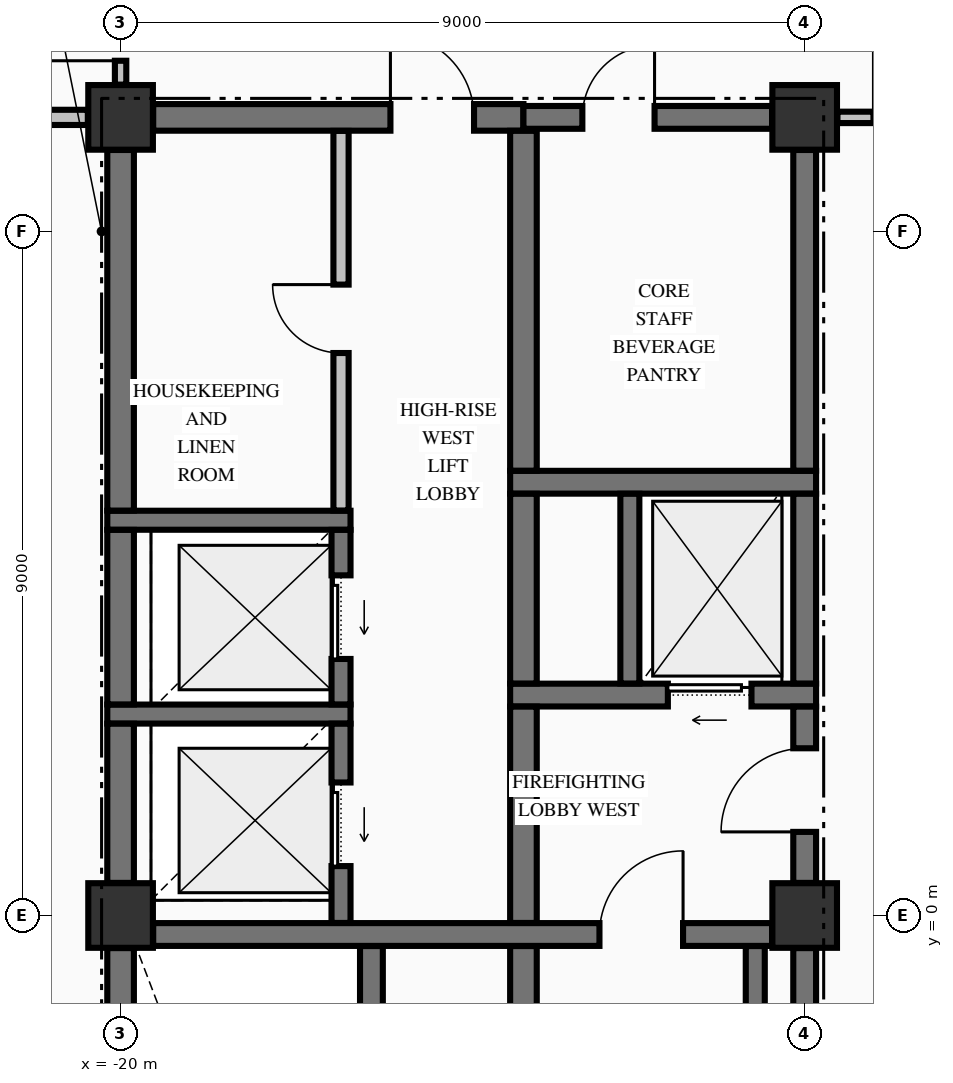
"""IFC4 building model, lengths in metres.
Left out: names, types, materials, properties, quantities, classifications, styles, units other than length and angle.
Written with IfcOpenShell. Run it as: python <this file> out.ifc"""

import sys

from ifc_helpers import new_model, si_unit, direction, frame, frame_2d, origin, origin_2d, place, context, subcontext, project, spatial, rectangle, extrude, element, fill, save


model = new_model("IFC4")
c1 = context("Model", 3, precision=1e-05, world=origin(), true_north=direction((0.0, 1.0)))
c2 = subcontext(c1, "Body", "Model", "MODEL_VIEW")
j1 = project(units=[si_unit("LENGTHUNIT", "METRE"), si_unit("PLANEANGLEUNIT", "RADIAN")], contexts=[c1])
p1 = place(None, origin())
s1 = spatial("IfcSite", under=j1, at=p1, CompositionType="ELEMENT")
p2 = place(p1, origin())
s2 = spatial("IfcBuilding", under=s1, at=p2, CompositionType="ELEMENT")
p3 = place(p2, frame((0.0, 0.0, 208.46)))
s3 = spatial("IfcBuildingStorey", under=s2, at=p3, CompositionType="ELEMENT", Elevation=208.46)
for number, where, z_axis, x_axis in (
    (1, (-20.0, 10.5, -0.25), (0.0, 0.0, 1.0), (1.0, 0.0, 0.0)),
    (2, (-11.0, 0.0, -0.25), (0.0, 0.0, 1.0), (1.0, 0.0, 0.0)),
    (3, (-11.0, 10.5, -0.25), (0.0, 0.0, 1.0), (1.0, 0.0, 0.0)),
    (4, (-20.0, 0.0, -0.25), (0.0, 0.0, 1.0), (1.0, 0.0, 0.0)),
):
    element("IfcColumn", number, at=place(p3, frame(where, z_axis=z_axis, x_axis=x_axis)), inside=s3, PredefinedType="COLUMN", context=c2, shape_type="SweptSolid", body=[
        extrude(rectangle(XDim=0.85, YDim=0.85, at=origin_2d()), origin(), (0.0, 0.0, 1.0), 3.325),
    ])
p4 = place(p3, frame((-19.571, -0.25, 0.0), z_axis=(0.0, 0.0, 1.0), x_axis=(1.0, 0.0, 0.0)))
e5 = element("IfcWall", 5, at=p4, inside=s3, PredefinedType="SHEAR", context=c2, shape_type="SweptSolid", body=[
    extrude(rectangle(XDim=8.142, YDim=0.3, at=frame_2d((4.071, 0.0))), origin(), (0.0, 0.0, 1.0), 3.075),
])
p5 = place(p4, frame((5.871, 0.0, 0.0)))
e6 = element("IfcOpeningElement", 6, at=p5, cuts=e5, PredefinedType="OPENING", context=c2, shape_type="SweptSolid", body=[
    extrude(rectangle(XDim=1.1, YDim=2.15, at=frame_2d((0.55, 1.075))), frame((0.0, 0.16, 0.0), z_axis=(0.0, -1.0, 0.0), x_axis=(1.0, 0.0, 0.0)), (0.0, 0.0, 1.0), 0.32),
])
p6 = place(p3, frame((-20.175, 2.65, 0.0), z_axis=(0.0, 0.0, 1.0), x_axis=(1.0, 0.0, 0.0)))
e7 = element("IfcWall", 7, at=p6, inside=s3, PredefinedType="SOLIDWALL", context=c2, shape_type="SweptSolid", body=[
    extrude(rectangle(XDim=3.2, YDim=0.25, at=frame_2d((1.6, 0.0))), origin(), (0.0, 0.0, 1.0), 3.075),
])
p7 = place(p3, frame((-14.875, 2.9, 0.0), z_axis=(0.0, 0.0, 1.0), x_axis=(1.0, 0.0, 0.0)))
e8 = element("IfcWall", 8, at=p7, inside=s3, PredefinedType="SHEAR", context=c2, shape_type="SweptSolid", body=[
    extrude(rectangle(XDim=4.025, YDim=0.3, at=frame_2d((2.012, 0.0))), origin(), (0.0, 0.0, 1.0), 3.075),
])
p8 = place(p7, frame((2.075, 0.0, 0.0)))
e9 = element("IfcOpeningElement", 9, at=p8, cuts=e8, PredefinedType="OPENING", context=c2, shape_type="SweptSolid", body=[
    extrude(rectangle(XDim=1.1, YDim=2.2, at=frame_2d((0.55, 1.1))), frame((0.0, 0.16, 0.0), z_axis=(0.0, -1.0, 0.0), x_axis=(1.0, 0.0, 0.0)), (0.0, 0.0, 1.0), 0.32),
])
p9 = place(p3, frame((-20.175, 5.2, 0.0), z_axis=(0.0, 0.0, 1.0), x_axis=(1.0, 0.0, 0.0)))
e10 = element("IfcWall", 10, at=p9, inside=s3, PredefinedType="SOLIDWALL", context=c2, shape_type="SweptSolid", body=[
    extrude(rectangle(XDim=3.2, YDim=0.25, at=frame_2d((1.6, 0.0))), origin(), (0.0, 0.0, 1.0), 3.075),
])
p10 = place(p3, frame((-14.875, 5.7, 0.0), z_axis=(0.0, 0.0, 1.0), x_axis=(1.0, 0.0, 0.0)))
e11 = element("IfcWall", 11, at=p10, inside=s3, PredefinedType="SHEAR", context=c2, shape_type="SweptSolid", body=[
    extrude(rectangle(XDim=4.025, YDim=0.3, at=frame_2d((2.012, 0.0))), origin(), (0.0, 0.0, 1.0), 3.075),
])
p11 = place(p3, frame((-19.571, 10.5, 0.0), z_axis=(0.0, 0.0, 1.0), x_axis=(1.0, 0.0, 0.0)))
e12 = element("IfcWall", 12, at=p11, inside=s3, PredefinedType="SHEAR", context=c2, shape_type="SweptSolid", body=[
    extrude(rectangle(XDim=4.871, YDim=0.35, at=frame_2d((2.436, 0.0))), origin(), (0.0, 0.0, 1.0), 3.075),
])
p12 = place(p11, frame((3.121, 0.0, 0.0)))
e13 = element("IfcOpeningElement", 13, at=p12, cuts=e12, PredefinedType="OPENING", context=c2, shape_type="SweptSolid", body=[
    extrude(rectangle(XDim=1.1, YDim=2.15, at=frame_2d((0.55, 1.075))), frame((0.0, 0.185, 0.0), z_axis=(0.0, -1.0, 0.0), x_axis=(1.0, 0.0, 0.0)), (0.0, 0.0, 1.0), 0.37),
])
p13 = place(p3, frame((-14.7, 10.5, 0.0), z_axis=(0.0, 0.0, 1.0), x_axis=(1.0, 0.0, 0.0)))
e14 = element("IfcWall", 14, at=p13, inside=s3, PredefinedType="SHEAR", context=c2, shape_type="SweptSolid", body=[
    extrude(rectangle(XDim=3.271, YDim=0.3, at=frame_2d((1.635, 0.0))), origin(), (0.0, 0.0, 1.0), 3.075),
])
p14 = place(p13, frame((0.775, 0.0, 0.0)))
e15 = element("IfcOpeningElement", 15, at=p14, cuts=e14, PredefinedType="OPENING", context=c2, shape_type="SweptSolid", body=[
    extrude(rectangle(XDim=0.95, YDim=2.15, at=frame_2d((0.475, 1.075))), frame((0.0, 0.16, 0.0), z_axis=(0.0, -1.0, 0.0), x_axis=(1.0, 0.0, 0.0)), (0.0, 0.0, 1.0), 0.32),
])
p15 = place(p3, frame((-26.835, 10.5, 0.0), z_axis=(0.0, 0.0, 1.0), x_axis=(1.0, 0.0, 0.0)))
e16 = element("IfcWall", 16, at=p15, inside=s3, PredefinedType="PARTITIONING", context=c2, shape_type="SweptSolid", body=[
    extrude(rectangle(XDim=6.404, YDim=0.2, at=frame_2d((3.202, 0.0))), origin(), (0.0, 0.0, 1.0), 3.075),
])
p16 = place(p15, frame((2.86, 0.0, 0.0)))
e17 = element("IfcOpeningElement", 17, at=p16, cuts=e16, PredefinedType="OPENING", context=c2, shape_type="SweptSolid", body=[
    extrude(rectangle(XDim=0.95, YDim=2.15, at=frame_2d((0.475, 1.075))), frame((0.0, 0.11, 0.0), z_axis=(0.0, -1.0, 0.0), x_axis=(1.0, 0.0, 0.0)), (0.0, 0.0, 1.0), 0.22),
])
p17 = place(p3, frame((-10.569, 10.5, 0.0), z_axis=(0.0, 0.0, 1.0), x_axis=(1.0, 0.0, 0.0)))
e18 = element("IfcWall", 18, at=p17, inside=s3, PredefinedType="PARTITIONING", context=c2, shape_type="SweptSolid", body=[
    extrude(rectangle(XDim=21.138, YDim=0.15, at=frame_2d((10.569, 0.0))), origin(), (0.0, 0.0, 1.0), 3.075),
])
p18 = place(p17, frame((0.474, 0.0, 0.0)))
e19 = element("IfcOpeningElement", 19, at=p18, cuts=e18, PredefinedType="OPENING", context=c2, shape_type="SweptSolid", body=[
    extrude(rectangle(XDim=1.05, YDim=2.15, at=frame_2d((0.525, 1.075))), frame((0.0, 0.085, 0.0), z_axis=(0.0, -1.0, 0.0), x_axis=(1.0, 0.0, 0.0)), (0.0, 0.0, 1.0), 0.17),
])
p19 = place(p17, frame((19.614, 0.0, 0.0)))
e20 = element("IfcOpeningElement", 20, at=p19, cuts=e18, PredefinedType="OPENING", context=c2, shape_type="SweptSolid", body=[
    extrude(rectangle(XDim=1.05, YDim=2.15, at=frame_2d((0.525, 1.075))), frame((0.0, 0.085, 0.0), z_axis=(0.0, -1.0, 0.0), x_axis=(1.0, 0.0, 0.0)), (0.0, 0.0, 1.0), 0.17),
])
p20 = place(p3, frame((-20.0, -9.521, 0.0), z_axis=(0.0, 0.0, 1.0), x_axis=(0.0, 1.0, 0.0)))
e21 = element("IfcWall", 21, at=p20, inside=s3, PredefinedType="SHEAR", context=c2, shape_type="SweptSolid", body=[
    extrude(rectangle(XDim=9.092, YDim=0.35, at=frame_2d((4.546, 0.0))), origin(), (0.0, 0.0, 1.0), 3.075),
])
p21 = place(p3, frame((-20.0, 0.429, 0.0), z_axis=(0.0, 0.0, 1.0), x_axis=(0.0, 1.0, 0.0)))
e22 = element("IfcWall", 22, at=p21, inside=s3, PredefinedType="SHEAR", context=c2, shape_type="SweptSolid", body=[
    extrude(rectangle(XDim=2.094, YDim=0.35, at=frame_2d((1.047, 0.0))), origin(), (0.0, 0.0, 1.0), 3.075),
])
p22 = place(p3, frame((-20.0, 2.777, 0.0), z_axis=(0.0, 0.0, 1.0), x_axis=(0.0, 1.0, 0.0)))
e23 = element("IfcWall", 23, at=p22, inside=s3, PredefinedType="SHEAR", context=c2, shape_type="SweptSolid", body=[
    extrude(rectangle(XDim=2.296, YDim=0.35, at=frame_2d((1.148, 0.0))), origin(), (0.0, 0.0, 1.0), 3.075),
])
p23 = place(p3, frame((-20.0, 5.327, 0.0), z_axis=(0.0, 0.0, 1.0), x_axis=(0.0, 1.0, 0.0)))
e24 = element("IfcWall", 24, at=p23, inside=s3, PredefinedType="SHEAR", context=c2, shape_type="SweptSolid", body=[
    extrude(rectangle(XDim=4.744, YDim=0.35, at=frame_2d((2.372, 0.0))), origin(), (0.0, 0.0, 1.0), 3.075),
])
p24 = place(p3, frame((-17.1, -0.098, 0.0), z_axis=(0.0, 0.0, 1.0), x_axis=(0.0, 1.0, 0.0)))
e25 = element("IfcWall", 25, at=p24, inside=s3, PredefinedType="SOLIDWALL", context=c2, shape_type="SweptSolid", body=[
    extrude(rectangle(XDim=2.621, YDim=0.25, at=frame_2d((1.311, 0.0))), origin(), (0.0, 0.0, 1.0), 3.075),
])
p25 = place(p24, frame((0.748, 0.0, 0.0)))
e26 = element("IfcOpeningElement", 26, at=p25, cuts=e25, PredefinedType="OPENING", context=c2, shape_type="SweptSolid", body=[
    extrude(rectangle(XDim=1.1, YDim=2.2, at=frame_2d((0.55, 1.1))), frame((0.0, 0.135, 0.0), z_axis=(0.0, -1.0, 0.0), x_axis=(1.0, 0.0, 0.0)), (0.0, 0.0, 1.0), 0.27),
])
p26 = place(p3, frame((-17.1, 2.777, 0.0), z_axis=(0.0, 0.0, 1.0), x_axis=(0.0, 1.0, 0.0)))
e27 = element("IfcWall", 27, at=p26, inside=s3, PredefinedType="SOLIDWALL", context=c2, shape_type="SweptSolid", body=[
    extrude(rectangle(XDim=2.296, YDim=0.25, at=frame_2d((1.148, 0.0))), origin(), (0.0, 0.0, 1.0), 3.075),
])
p27 = place(p26, frame((0.598, 0.0, 0.0)))
e28 = element("IfcOpeningElement", 28, at=p27, cuts=e27, PredefinedType="OPENING", context=c2, shape_type="SweptSolid", body=[
    extrude(rectangle(XDim=1.1, YDim=2.2, at=frame_2d((0.55, 1.1))), frame((0.0, 0.135, 0.0), z_axis=(0.0, -1.0, 0.0), x_axis=(1.0, 0.0, 0.0)), (0.0, 0.0, 1.0), 0.27),
])
p28 = place(p3, frame((-16.7, -9.773, 0.0), z_axis=(0.0, 0.0, 1.0), x_axis=(0.0, 1.0, 0.0)))
e29 = element("IfcWall", 29, at=p28, inside=s3, PredefinedType="SHEAR", context=c2, shape_type="SweptSolid", body=[
    extrude(rectangle(XDim=9.371, YDim=0.3, at=frame_2d((4.686, 0.0))), origin(), (0.0, 0.0, 1.0), 3.075),
])
p29 = place(p3, frame((-14.7, -9.773, 0.0), z_axis=(0.0, 0.0, 1.0), x_axis=(0.0, 1.0, 0.0)))
e30 = element("IfcWall", 30, at=p29, inside=s3, PredefinedType="SHEAR", context=c2, shape_type="SweptSolid", body=[
    extrude(rectangle(XDim=9.371, YDim=0.35, at=frame_2d((4.686, 0.0))), origin(), (0.0, 0.0, 1.0), 3.075),
])
p30 = place(p3, frame((-14.7, -0.098, 0.0), z_axis=(0.0, 0.0, 1.0), x_axis=(0.0, 1.0, 0.0)))
e31 = element("IfcWall", 31, at=p30, inside=s3, PredefinedType="SHEAR", context=c2, shape_type="SweptSolid", body=[
    extrude(rectangle(XDim=2.846, YDim=0.35, at=frame_2d((1.423, 0.0))), origin(), (0.0, 0.0, 1.0), 3.075),
])
p31 = place(p3, frame((-14.7, 3.052, 0.0), z_axis=(0.0, 0.0, 1.0), x_axis=(0.0, 1.0, 0.0)))
e32 = element("IfcWall", 32, at=p31, inside=s3, PredefinedType="SHEAR", context=c2, shape_type="SweptSolid", body=[
    extrude(rectangle(XDim=2.496, YDim=0.35, at=frame_2d((1.248, 0.0))), origin(), (0.0, 0.0, 1.0), 3.075),
])
p32 = place(p3, frame((-14.7, 5.852, 0.0), z_axis=(0.0, 0.0, 1.0), x_axis=(0.0, 1.0, 0.0)))
e33 = element("IfcWall", 33, at=p32, inside=s3, PredefinedType="SHEAR", context=c2, shape_type="SweptSolid", body=[
    extrude(rectangle(XDim=4.471, YDim=0.35, at=frame_2d((2.235, 0.0))), origin(), (0.0, 0.0, 1.0), 3.075),
])
p33 = place(p3, frame((-13.3, 3.052, 0.0), z_axis=(0.0, 0.0, 1.0), x_axis=(0.0, 1.0, 0.0)))
e34 = element("IfcWall", 34, at=p33, inside=s3, PredefinedType="SOLIDWALL", context=c2, shape_type="SweptSolid", body=[
    extrude(rectangle(XDim=2.496, YDim=0.25, at=frame_2d((1.248, 0.0))), origin(), (0.0, 0.0, 1.0), 3.075),
])
p34 = place(p3, frame((-11.65, -9.798, 0.0), z_axis=(0.0, 0.0, 1.0), x_axis=(0.0, 1.0, 0.0)))
e35 = element("IfcWall", 35, at=p34, inside=s3, PredefinedType="SOLIDWALL", context=c2, shape_type="SweptSolid", body=[
    extrude(rectangle(XDim=9.396, YDim=0.25, at=frame_2d((4.698, 0.0))), origin(), (0.0, 0.0, 1.0), 3.075),
])
p35 = place(p3, frame((-11.0, -9.521, 0.0), z_axis=(0.0, 0.0, 1.0), x_axis=(0.0, 1.0, 0.0)))
e36 = element("IfcWall", 36, at=p35, inside=s3, PredefinedType="SHEAR", context=c2, shape_type="SweptSolid", body=[
    extrude(rectangle(XDim=9.092, YDim=0.3, at=frame_2d((4.546, 0.0))), origin(), (0.0, 0.0, 1.0), 3.075),
])
p36 = place(p3, frame((-11.0, 0.429, 0.0), z_axis=(0.0, 0.0, 1.0), x_axis=(0.0, 1.0, 0.0)))
e37 = element("IfcWall", 37, at=p36, inside=s3, PredefinedType="SHEAR", context=c2, shape_type="SweptSolid", body=[
    extrude(rectangle(XDim=2.319, YDim=0.3, at=frame_2d((1.16, 0.0))), origin(), (0.0, 0.0, 1.0), 3.075),
])
p37 = place(p36, frame((0.671, 0.0, 0.0)))
e38 = element("IfcOpeningElement", 38, at=p37, cuts=e37, PredefinedType="OPENING", context=c2, shape_type="SweptSolid", body=[
    extrude(rectangle(XDim=1.1, YDim=2.15, at=frame_2d((0.55, 1.075))), frame((0.0, 0.16, 0.0), z_axis=(0.0, -1.0, 0.0), x_axis=(1.0, 0.0, 0.0)), (0.0, 0.0, 1.0), 0.32),
])
p38 = place(p3, frame((-11.0, 3.052, 0.0), z_axis=(0.0, 0.0, 1.0), x_axis=(0.0, 1.0, 0.0)))
e39 = element("IfcWall", 39, at=p38, inside=s3, PredefinedType="SHEAR", context=c2, shape_type="SweptSolid", body=[
    extrude(rectangle(XDim=2.496, YDim=0.3, at=frame_2d((1.248, 0.0))), origin(), (0.0, 0.0, 1.0), 3.075),
])
p39 = place(p3, frame((-11.0, 5.852, 0.0), z_axis=(0.0, 0.0, 1.0), x_axis=(0.0, 1.0, 0.0)))
e40 = element("IfcWall", 40, at=p39, inside=s3, PredefinedType="SHEAR", context=c2, shape_type="SweptSolid", body=[
    extrude(rectangle(XDim=4.219, YDim=0.3, at=frame_2d((2.109, 0.0))), origin(), (0.0, 0.0, 1.0), 3.075),
])
p40 = place(p3, frame((-20.0, 10.931, 0.0), z_axis=(0.0, 0.0, 1.0), x_axis=(0.0, 1.0, 0.0)))
e41 = element("IfcWall", 41, at=p40, inside=s3, PredefinedType="PARTITIONING", context=c2, shape_type="SweptSolid", body=[
    extrude(rectangle(XDim=1.916, YDim=0.15, at=frame_2d((0.958, 0.0))), origin(), (0.0, 0.0, 1.0), 2.267),
])
p41 = place(p40, frame((0.314, 0.0, 0.0)))
e42 = element("IfcOpeningElement", 42, at=p41, cuts=e41, PredefinedType="OPENING", context=c2, shape_type="SweptSolid", body=[
    extrude(rectangle(XDim=0.95, YDim=2.15, at=frame_2d((0.475, 1.075))), frame((0.0, 0.085, 0.0), z_axis=(0.0, -1.0, 0.0), x_axis=(1.0, 0.0, 0.0)), (0.0, 0.0, 1.0), 0.17),
])
p42 = place(p3, frame((-17.1, 5.328, 0.0), z_axis=(0.0, 0.0, 1.0), x_axis=(0.0, 1.0, 0.0)))
e43 = element("IfcWall", 43, at=p42, inside=s3, PredefinedType="PARTITIONING", context=c2, shape_type="SweptSolid", body=[
    extrude(rectangle(XDim=4.994, YDim=0.2, at=frame_2d((2.497, 0.0))), origin(), (0.0, 0.0, 1.0), 3.075),
])
p43 = place(p42, frame((2.072, 0.0, 0.0)))
e44 = element("IfcOpeningElement", 44, at=p43, cuts=e43, PredefinedType="OPENING", context=c2, shape_type="SweptSolid", body=[
    extrude(rectangle(XDim=0.9, YDim=2.15, at=frame_2d((0.45, 1.075))), frame((0.0, 0.11, 0.0), z_axis=(0.0, -1.0, 0.0), x_axis=(1.0, 0.0, 0.0)), (0.0, 0.0, 1.0), 0.22),
])
p44 = place(p5, origin())
e45 = element("IfcDoor", 45, at=p44, inside=s3, OperationType="SINGLE_SWING_RIGHT", PredefinedType="DOOR", context=c2, shape_type="SweptSolid", body=[
    extrude(rectangle(XDim=1.1, YDim=2.15, at=frame_2d((0.55, 1.075))), frame((0.0, 0.025, 0.0), z_axis=(0.0, -1.0, 0.0), x_axis=(1.0, 0.0, 0.0)), (0.0, 0.0, 1.0), 0.05),
])
fill(e6, e45)
p45 = place(p37, origin())
e46 = element("IfcDoor", 46, at=p45, inside=s3, OperationType="SINGLE_SWING_LEFT", PredefinedType="DOOR", context=c2, shape_type="SweptSolid", body=[
    extrude(rectangle(XDim=1.1, YDim=2.15, at=frame_2d((0.55, 1.075))), frame((0.0, 0.025, 0.0), z_axis=(0.0, -1.0, 0.0), x_axis=(1.0, 0.0, 0.0)), (0.0, 0.0, 1.0), 0.05),
])
fill(e38, e46)
p46 = place(p8, origin())
e47 = element("IfcDoor", 47, at=p46, inside=s3, OperationType="SLIDING_TO_LEFT", PredefinedType="DOOR", context=c2, shape_type="SweptSolid", body=[
    extrude(rectangle(XDim=1.1, YDim=2.2, at=frame_2d((0.55, 1.1))), frame((0.0, 0.025, 0.0), z_axis=(0.0, -1.0, 0.0), x_axis=(1.0, 0.0, 0.0)), (0.0, 0.0, 1.0), 0.05),
])
fill(e9, e47)
p47 = place(p14, origin())
e48 = element("IfcDoor", 48, at=p47, inside=s3, OperationType="SINGLE_SWING_RIGHT", PredefinedType="DOOR", context=c2, shape_type="SweptSolid", body=[
    extrude(rectangle(XDim=0.95, YDim=2.15, at=frame_2d((0.475, 1.075))), frame((0.0, 0.025, 0.0), z_axis=(0.0, -1.0, 0.0), x_axis=(1.0, 0.0, 0.0)), (0.0, 0.0, 1.0), 0.05),
])
fill(e15, e48)
p48 = place(p25, origin())
e49 = element("IfcDoor", 49, at=p48, inside=s3, OperationType="SLIDING_TO_LEFT", PredefinedType="DOOR", context=c2, shape_type="SweptSolid", body=[
    extrude(rectangle(XDim=1.1, YDim=2.2, at=frame_2d((0.55, 1.1))), frame((0.0, 0.025, 0.0), z_axis=(0.0, -1.0, 0.0), x_axis=(1.0, 0.0, 0.0)), (0.0, 0.0, 1.0), 0.05),
])
fill(e26, e49)
p49 = place(p27, origin())
e50 = element("IfcDoor", 50, at=p49, inside=s3, OperationType="SLIDING_TO_LEFT", PredefinedType="DOOR", context=c2, shape_type="SweptSolid", body=[
    extrude(rectangle(XDim=1.1, YDim=2.2, at=frame_2d((0.55, 1.1))), frame((0.0, 0.025, 0.0), z_axis=(0.0, -1.0, 0.0), x_axis=(1.0, 0.0, 0.0)), (0.0, 0.0, 1.0), 0.05),
])
fill(e28, e50)
p50 = place(p12, origin())
e51 = element("IfcDoor", 51, at=p50, inside=s3, OperationType="SINGLE_SWING_LEFT", PredefinedType="DOOR", context=c2, shape_type="SweptSolid", body=[
    extrude(rectangle(XDim=1.1, YDim=2.15, at=frame_2d((0.55, 1.075))), frame((0.0, 0.025, 0.0), z_axis=(0.0, -1.0, 0.0), x_axis=(1.0, 0.0, 0.0)), (0.0, 0.0, 1.0), 0.05),
])
fill(e13, e51)
p51 = place(p43, origin())
e52 = element("IfcDoor", 52, at=p51, inside=s3, OperationType="SINGLE_SWING_RIGHT", PredefinedType="DOOR", context=c2, shape_type="SweptSolid", body=[
    extrude(rectangle(XDim=0.9, YDim=2.15, at=frame_2d((0.45, 1.075))), frame((0.0, 0.025, 0.0), z_axis=(0.0, -1.0, 0.0), x_axis=(1.0, 0.0, 0.0)), (0.0, 0.0, 1.0), 0.05),
])
fill(e44, e52)
p52 = place(p41, origin())
e53 = element("IfcDoor", 53, at=p52, inside=s3, OperationType="SINGLE_SWING_LEFT", PredefinedType="DOOR", context=c2, shape_type="SweptSolid", body=[
    extrude(rectangle(XDim=0.95, YDim=2.15, at=frame_2d((0.475, 1.075))), frame((0.0, 0.025, 0.0), z_axis=(0.0, -1.0, 0.0), x_axis=(1.0, 0.0, 0.0)), (0.0, 0.0, 1.0), 0.05),
])
fill(e42, e53)
save(model, sys.argv[1])
